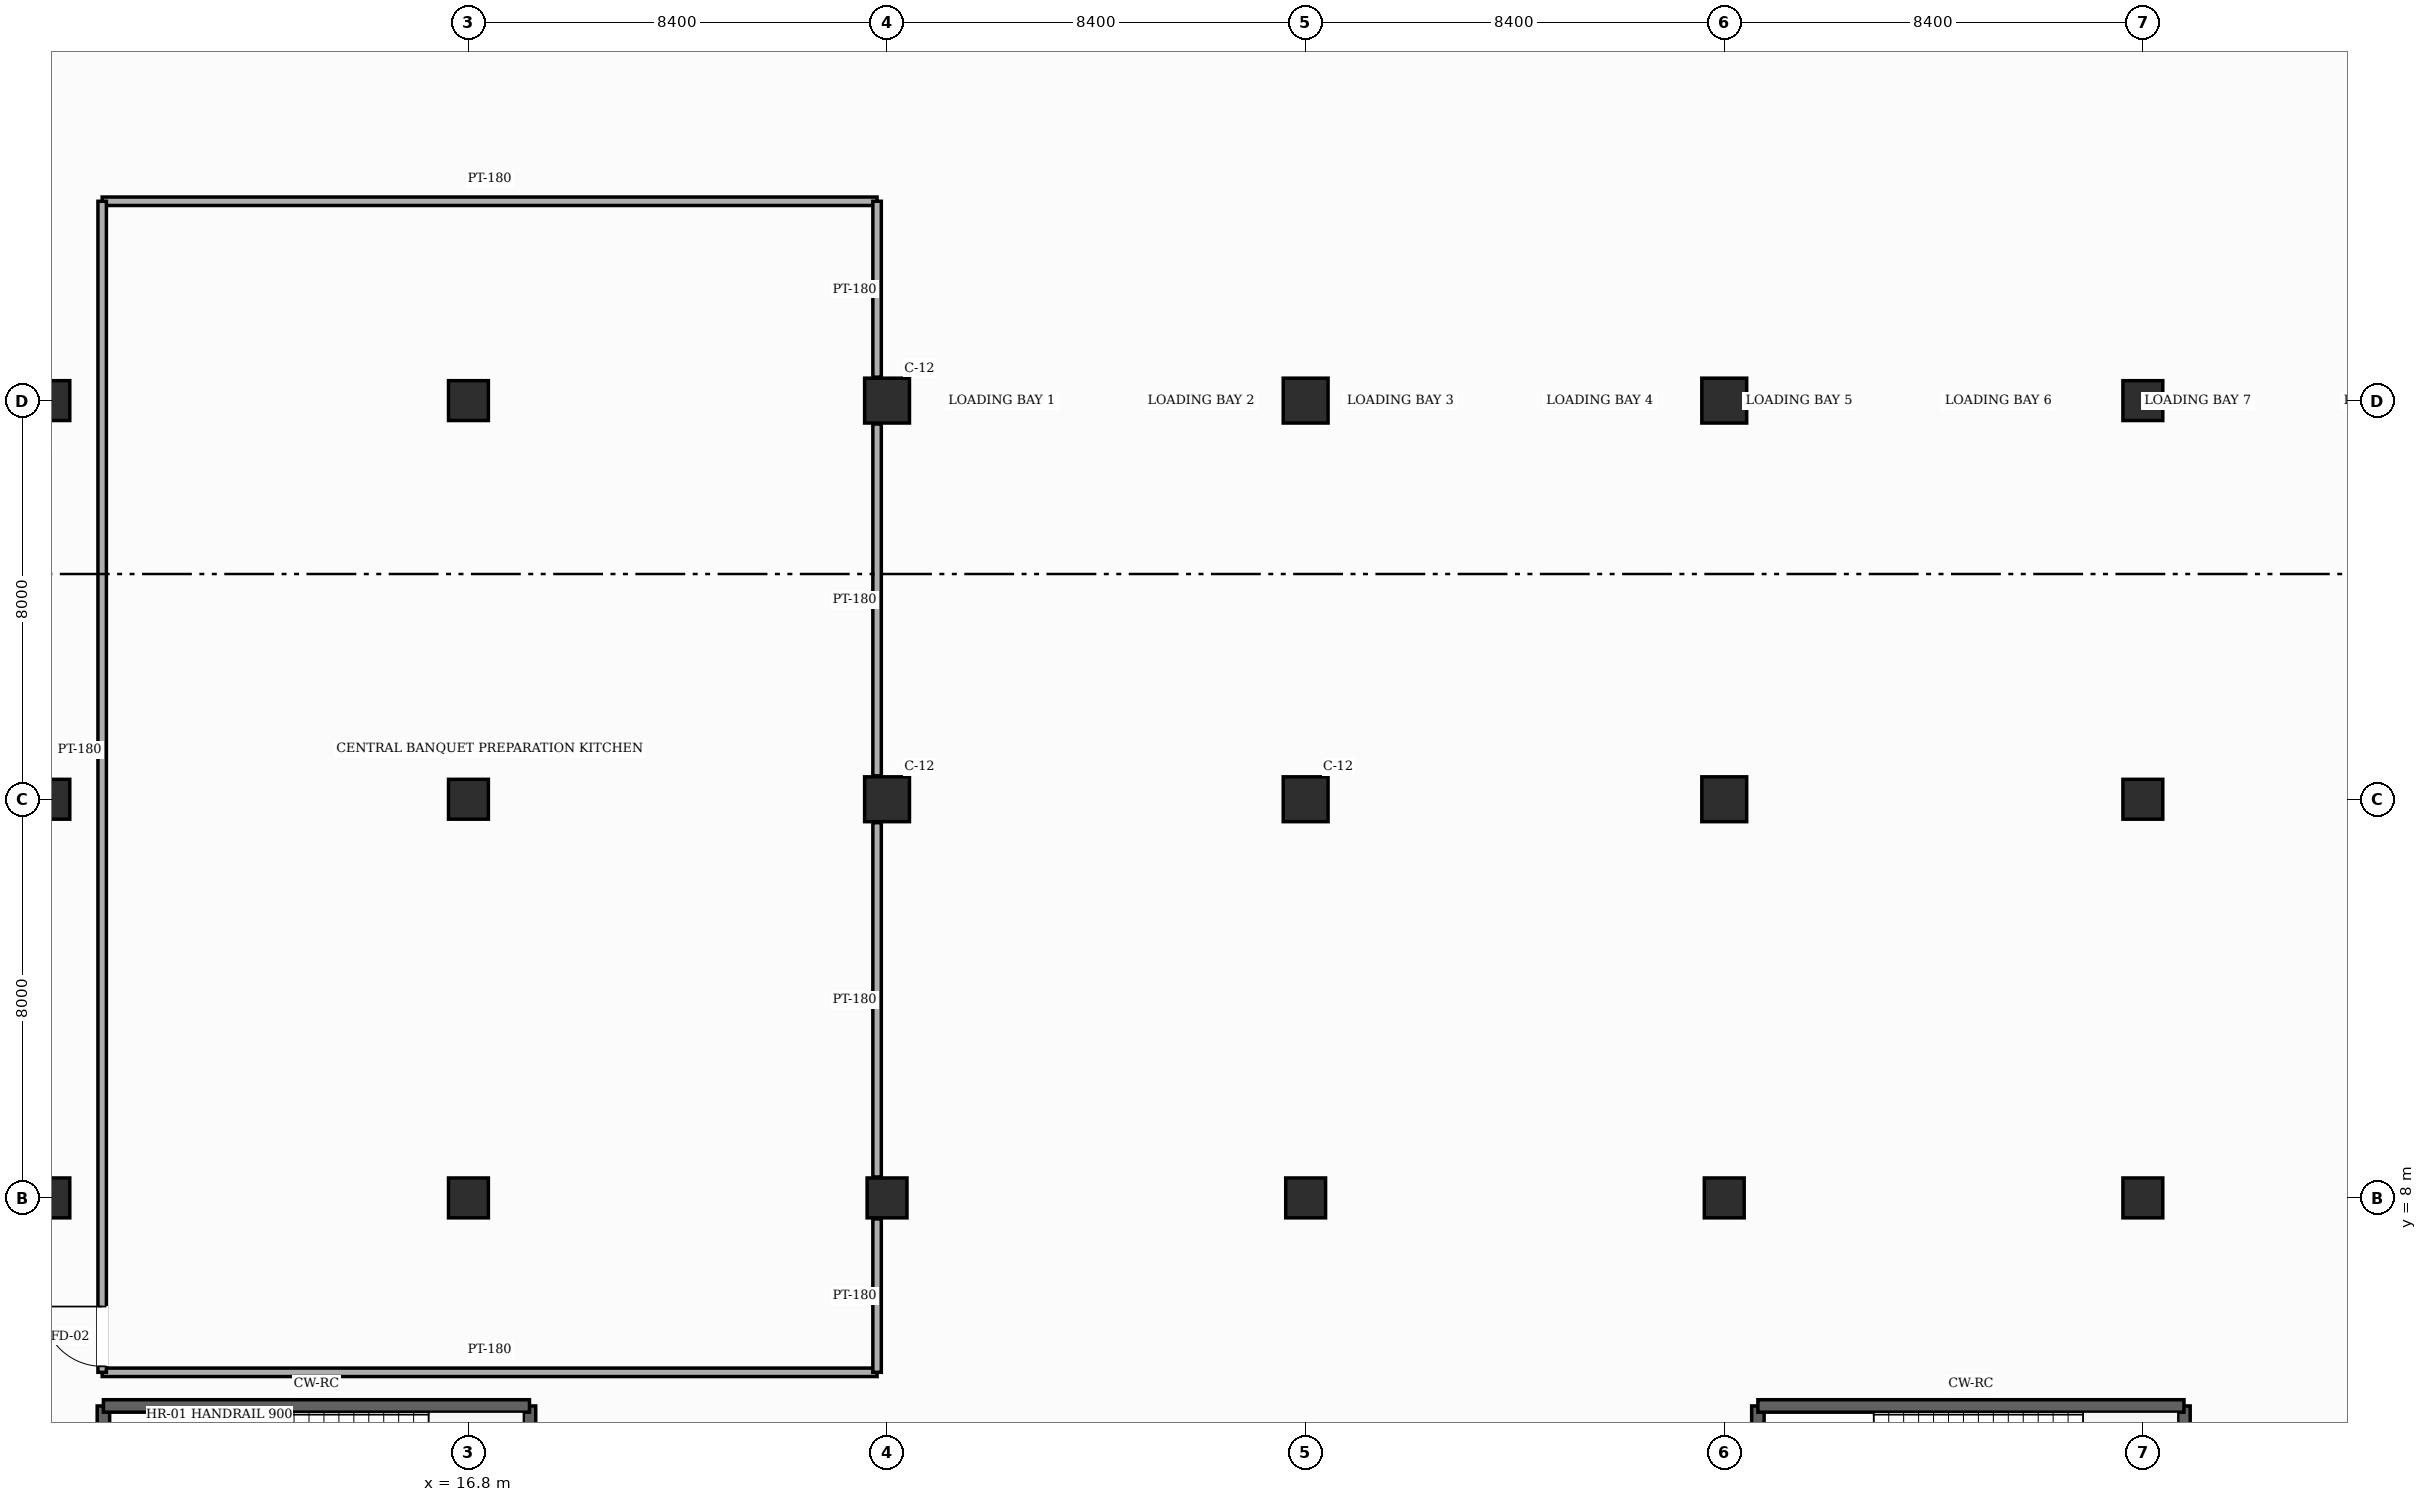
"""IFC4 building model, lengths in metres.
Left out: names, types, materials, properties, quantities, classifications, styles, units other than length and angle.
Written with IfcOpenShell. Run it as: python <this file> out.ifc"""

import sys

from ifc_helpers import new_model, si_unit, direction, frame, frame_2d, origin, origin_2d, place, context, subcontext, project, spatial, rectangle, hollow_rectangle, extrude, element, fill, save


model = new_model("IFC4")
c1 = context("Model", 3, precision=1e-05, world=origin(), true_north=direction((0.0, 1.0)))
c2 = subcontext(c1, "Body", "Model", "MODEL_VIEW")
j1 = project(units=[si_unit("LENGTHUNIT", "METRE"), si_unit("PLANEANGLEUNIT", "RADIAN")], contexts=[c1])
p1 = place(None, origin())
s1 = spatial("IfcSite", under=j1, at=p1, CompositionType="ELEMENT")
p2 = place(p1, origin())
s2 = spatial("IfcBuilding", under=s1, at=p2, CompositionType="ELEMENT")
p3 = place(p2, frame((0.0, 0.0, -5.4)))
s3 = spatial("IfcBuildingStorey", under=s2, at=p3, CompositionType="ELEMENT", Elevation=-5.4)
for number, where, z_axis, x_axis in (
    (1, (8.4, 8.0, 0.0), (0.0, 0.0, 1.0), (1.0, 0.0, 0.0)),
    (2, (8.4, 16.0, 0.0), (0.0, 0.0, 1.0), (1.0, 0.0, 0.0)),
    (3, (8.4, 24.0, 0.0), (0.0, 0.0, 1.0), (1.0, 0.0, 0.0)),
    (4, (16.8, 8.0, 0.0), (0.0, 0.0, 1.0), (1.0, 0.0, 0.0)),
    (5, (16.8, 16.0, 0.0), (0.0, 0.0, 1.0), (1.0, 0.0, 0.0)),
    (6, (16.8, 24.0, 0.0), (0.0, 0.0, 1.0), (1.0, 0.0, 0.0)),
    (7, (25.2, 8.0, 0.0), (0.0, 0.0, 1.0), (1.0, 0.0, 0.0)),
):
    element("IfcColumn", number, at=place(p3, frame(where, z_axis=z_axis, x_axis=x_axis)), inside=s3, PredefinedType="COLUMN", context=c2, shape_type="SweptSolid", body=[
        extrude(hollow_rectangle(XDim=0.8, YDim=0.8, WallThickness=0.032, InnerFilletRadius=0.032, OuterFilletRadius=0.064, at=origin_2d()), origin(), (0.0, 0.0, 1.0), 5.4),
    ])
for number, where, z_axis, x_axis in (
    (8, (25.2, 16.0, 0.0), (0.0, 0.0, 1.0), (1.0, 0.0, 0.0)),
    (9, (25.2, 24.0, 0.0), (0.0, 0.0, 1.0), (1.0, 0.0, 0.0)),
):
    element("IfcColumn", number, at=place(p3, frame(where, z_axis=z_axis, x_axis=x_axis)), inside=s3, PredefinedType="COLUMN", context=c2, shape_type="SweptSolid", body=[
        extrude(rectangle(XDim=0.9, YDim=0.9, at=origin_2d()), origin(), (0.0, 0.0, 1.0), 5.12),
    ])
p4 = place(p3, frame((33.6, 8.0, 0.0), z_axis=(0.0, 0.0, 1.0), x_axis=(1.0, 0.0, 0.0)))
e10 = element("IfcColumn", 10, at=p4, inside=s3, PredefinedType="COLUMN", context=c2, shape_type="SweptSolid", body=[
    extrude(hollow_rectangle(XDim=0.8, YDim=0.8, WallThickness=0.032, InnerFilletRadius=0.032, OuterFilletRadius=0.064, at=origin_2d()), origin(), (0.0, 0.0, 1.0), 5.4),
])
for number, where, z_axis, x_axis in (
    (11, (33.6, 16.0, 0.0), (0.0, 0.0, 1.0), (1.0, 0.0, 0.0)),
    (12, (33.6, 24.0, 0.0), (0.0, 0.0, 1.0), (1.0, 0.0, 0.0)),
):
    element("IfcColumn", number, at=place(p3, frame(where, z_axis=z_axis, x_axis=x_axis)), inside=s3, PredefinedType="COLUMN", context=c2, shape_type="SweptSolid", body=[
        extrude(rectangle(XDim=0.9, YDim=0.9, at=origin_2d()), origin(), (0.0, 0.0, 1.0), 5.12),
    ])
p5 = place(p3, frame((42.0, 8.0, 0.0), z_axis=(0.0, 0.0, 1.0), x_axis=(1.0, 0.0, 0.0)))
e13 = element("IfcColumn", 13, at=p5, inside=s3, PredefinedType="COLUMN", context=c2, shape_type="SweptSolid", body=[
    extrude(hollow_rectangle(XDim=0.8, YDim=0.8, WallThickness=0.032, InnerFilletRadius=0.032, OuterFilletRadius=0.064, at=origin_2d()), origin(), (0.0, 0.0, 1.0), 5.4),
])
for number, where, z_axis, x_axis in (
    (14, (42.0, 16.0, 0.0), (0.0, 0.0, 1.0), (1.0, 0.0, 0.0)),
    (15, (42.0, 24.0, 0.0), (0.0, 0.0, 1.0), (1.0, 0.0, 0.0)),
):
    element("IfcColumn", number, at=place(p3, frame(where, z_axis=z_axis, x_axis=x_axis)), inside=s3, PredefinedType="COLUMN", context=c2, shape_type="SweptSolid", body=[
        extrude(rectangle(XDim=0.9, YDim=0.9, at=origin_2d()), origin(), (0.0, 0.0, 1.0), 5.12),
    ])
for number, where, z_axis, x_axis in (
    (16, (50.4, 8.0, 0.0), (0.0, 0.0, 1.0), (1.0, 0.0, 0.0)),
    (17, (50.4, 16.0, 0.0), (0.0, 0.0, 1.0), (1.0, 0.0, 0.0)),
    (18, (50.4, 24.0, 0.0), (0.0, 0.0, 1.0), (1.0, 0.0, 0.0)),
):
    element("IfcColumn", number, at=place(p3, frame(where, z_axis=z_axis, x_axis=x_axis)), inside=s3, PredefinedType="COLUMN", context=c2, shape_type="SweptSolid", body=[
        extrude(hollow_rectangle(XDim=0.8, YDim=0.8, WallThickness=0.032, InnerFilletRadius=0.032, OuterFilletRadius=0.064, at=origin_2d()), origin(), (0.0, 0.0, 1.0), 5.4),
    ])
p6 = place(p3, frame((9.475, 0.075, 0.0), z_axis=(0.0, 0.0, 1.0), x_axis=(0.0, 1.0, 0.0)))
e19 = element("IfcWall", 19, at=p6, inside=s3, PredefinedType="SHEAR", context=c2, shape_type="SweptSolid", body=[
    extrude(rectangle(XDim=3.75, YDim=0.25, at=frame_2d((1.875, 0.0))), origin(), (0.0, 0.0, 1.0), 5.12),
])
p7 = place(p6, frame((1.175, 0.0, 0.0)))
e20 = element("IfcOpeningElement", 20, at=p7, cuts=e19, PredefinedType="OPENING", context=c2, shape_type="SweptSolid", body=[
    extrude(rectangle(XDim=1.4, YDim=2.25, at=frame_2d((0.7, 1.125))), frame((0.0, 0.135, 0.0), z_axis=(0.0, -1.0, 0.0), x_axis=(1.0, 0.0, 0.0)), (0.0, 0.0, 1.0), 0.27),
])
p8 = place(p3, frame((18.025, 3.825, 0.0), z_axis=(0.0, 0.0, 1.0), x_axis=(0.0, -1.0, 0.0)))
e21 = element("IfcWall", 21, at=p8, inside=s3, PredefinedType="SHEAR", context=c2, shape_type="SweptSolid", body=[
    extrude(rectangle(XDim=3.75, YDim=0.25, at=frame_2d((1.875, 0.0))), origin(), (0.0, 0.0, 1.0), 5.12),
])
p9 = place(p3, frame((9.475, 3.825, 0.0), z_axis=(0.0, 0.0, 1.0), x_axis=(1.0, 0.0, 0.0)))
e22 = element("IfcWall", 22, at=p9, inside=s3, PredefinedType="SHEAR", context=c2, shape_type="SweptSolid", body=[
    extrude(rectangle(XDim=8.55, YDim=0.25, at=frame_2d((4.275, 0.0))), origin(), (0.0, 0.0, 1.0), 5.12),
])
p10 = place(p3, frame((42.675, 0.075, 0.0), z_axis=(0.0, 0.0, 1.0), x_axis=(0.0, 1.0, 0.0)))
e23 = element("IfcWall", 23, at=p10, inside=s3, PredefinedType="SHEAR", context=c2, shape_type="SweptSolid", body=[
    extrude(rectangle(XDim=3.75, YDim=0.25, at=frame_2d((1.875, 0.0))), origin(), (0.0, 0.0, 1.0), 5.12),
])
p11 = place(p10, frame((1.175, 0.0, 0.0)))
e24 = element("IfcOpeningElement", 24, at=p11, cuts=e23, PredefinedType="OPENING", context=c2, shape_type="SweptSolid", body=[
    extrude(rectangle(XDim=1.4, YDim=2.25, at=frame_2d((0.7, 1.125))), frame((0.0, 0.135, 0.0), z_axis=(0.0, -1.0, 0.0), x_axis=(1.0, 0.0, 0.0)), (0.0, 0.0, 1.0), 0.27),
])
p12 = place(p3, frame((51.225, 3.825, 0.0), z_axis=(0.0, 0.0, 1.0), x_axis=(0.0, -1.0, 0.0)))
e25 = element("IfcWall", 25, at=p12, inside=s3, PredefinedType="SHEAR", context=c2, shape_type="SweptSolid", body=[
    extrude(rectangle(XDim=3.75, YDim=0.25, at=frame_2d((1.875, 0.0))), origin(), (0.0, 0.0, 1.0), 5.12),
])
p13 = place(p3, frame((42.675, 3.825, 0.0), z_axis=(0.0, 0.0, 1.0), x_axis=(1.0, 0.0, 0.0)))
e26 = element("IfcWall", 26, at=p13, inside=s3, PredefinedType="SHEAR", context=c2, shape_type="SweptSolid", body=[
    extrude(rectangle(XDim=8.55, YDim=0.25, at=frame_2d((4.275, 0.0))), origin(), (0.0, 0.0, 1.0), 5.12),
])
p14 = place(p3, frame((9.45, 4.5, 0.0), z_axis=(0.0, 0.0, 1.0), x_axis=(1.0, 0.0, 0.0)))
e27 = element("IfcWall", 27, at=p14, inside=s3, PredefinedType="PARTITIONING", context=c2, shape_type="SweptSolid", body=[
    extrude(rectangle(XDim=15.55, YDim=0.17, at=frame_2d((7.775, 0.0))), origin(), (0.0, 0.0, 1.0), 5.105),
])
p15 = place(p3, frame((9.45, 28.0, 0.0), z_axis=(0.0, 0.0, 1.0), x_axis=(1.0, 0.0, 0.0)))
e28 = element("IfcWall", 28, at=p15, inside=s3, PredefinedType="PARTITIONING", context=c2, shape_type="SweptSolid", body=[
    extrude(rectangle(XDim=15.55, YDim=0.17, at=frame_2d((7.775, 0.0))), origin(), (0.0, 0.0, 1.0), 4.695),
])
p16 = place(p3, frame((9.45, 4.5, 0.0), z_axis=(0.0, 0.0, 1.0), x_axis=(0.0, 1.0, 0.0)))
e29 = element("IfcWall", 29, at=p16, inside=s3, PredefinedType="PARTITIONING", context=c2, shape_type="SweptSolid", body=[
    extrude(rectangle(XDim=23.5, YDim=0.17, at=frame_2d((11.75, 0.0))), origin(), (0.0, 0.0, 1.0), 5.105),
])
p17 = place(p16, frame((0.12, 0.0, 0.0)))
e30 = element("IfcOpeningElement", 30, at=p17, cuts=e29, PredefinedType="OPENING", context=c2, shape_type="SweptSolid", body=[
    extrude(rectangle(XDim=1.2, YDim=2.2, at=frame_2d((0.6, 1.1))), frame((0.0, 0.095, 0.0), z_axis=(0.0, -1.0, 0.0), x_axis=(1.0, 0.0, 0.0)), (0.0, 0.0, 1.0), 0.19),
])
p18 = place(p3, frame((25.0, 4.5, 0.0), z_axis=(0.0, 0.0, 1.0), x_axis=(0.0, 1.0, 0.0)))
e31 = element("IfcWall", 31, at=p18, inside=s3, PredefinedType="PARTITIONING", context=c2, shape_type="SweptSolid", body=[
    extrude(rectangle(XDim=3.08, YDim=0.17, at=frame_2d((1.54, 0.0))), origin(), (0.0, 0.0, 1.0), 4.345),
])
p19 = place(p3, frame((25.0, 8.42, 0.0), z_axis=(0.0, 0.0, 1.0), x_axis=(0.0, 1.0, 0.0)))
e32 = element("IfcWall", 32, at=p19, inside=s3, PredefinedType="PARTITIONING", context=c2, shape_type="SweptSolid", body=[
    extrude(rectangle(XDim=7.11, YDim=0.17, at=frame_2d((3.555, 0.0))), origin(), (0.0, 0.0, 1.0), 4.345),
])
p20 = place(p3, frame((25.0, 16.47, 0.0), z_axis=(0.0, 0.0, 1.0), x_axis=(0.0, 1.0, 0.0)))
e33 = element("IfcWall", 33, at=p20, inside=s3, PredefinedType="PARTITIONING", context=c2, shape_type="SweptSolid", body=[
    extrude(rectangle(XDim=7.06, YDim=0.17, at=frame_2d((3.53, 0.0))), origin(), (0.0, 0.0, 1.0), 4.345),
])
p21 = place(p3, frame((25.0, 24.47, 0.0), z_axis=(0.0, 0.0, 1.0), x_axis=(0.0, 1.0, 0.0)))
e34 = element("IfcWall", 34, at=p21, inside=s3, PredefinedType="PARTITIONING", context=c2, shape_type="SweptSolid", body=[
    extrude(rectangle(XDim=3.53, YDim=0.17, at=frame_2d((1.765, 0.0))), origin(), (0.0, 0.0, 1.0), 4.345),
])
p22 = place(p17, origin())
e35 = element("IfcDoor", 35, at=p22, inside=s3, OperationType="SINGLE_SWING_RIGHT", PredefinedType="DOOR", context=c2, shape_type="SweptSolid", body=[
    extrude(rectangle(XDim=1.2, YDim=2.2, at=frame_2d((0.6, 1.1))), frame((0.0, 0.025, 0.0), z_axis=(0.0, -1.0, 0.0), x_axis=(1.0, 0.0, 0.0)), (0.0, 0.0, 1.0), 0.05),
])
fill(e30, e35)
save(model, sys.argv[1])
